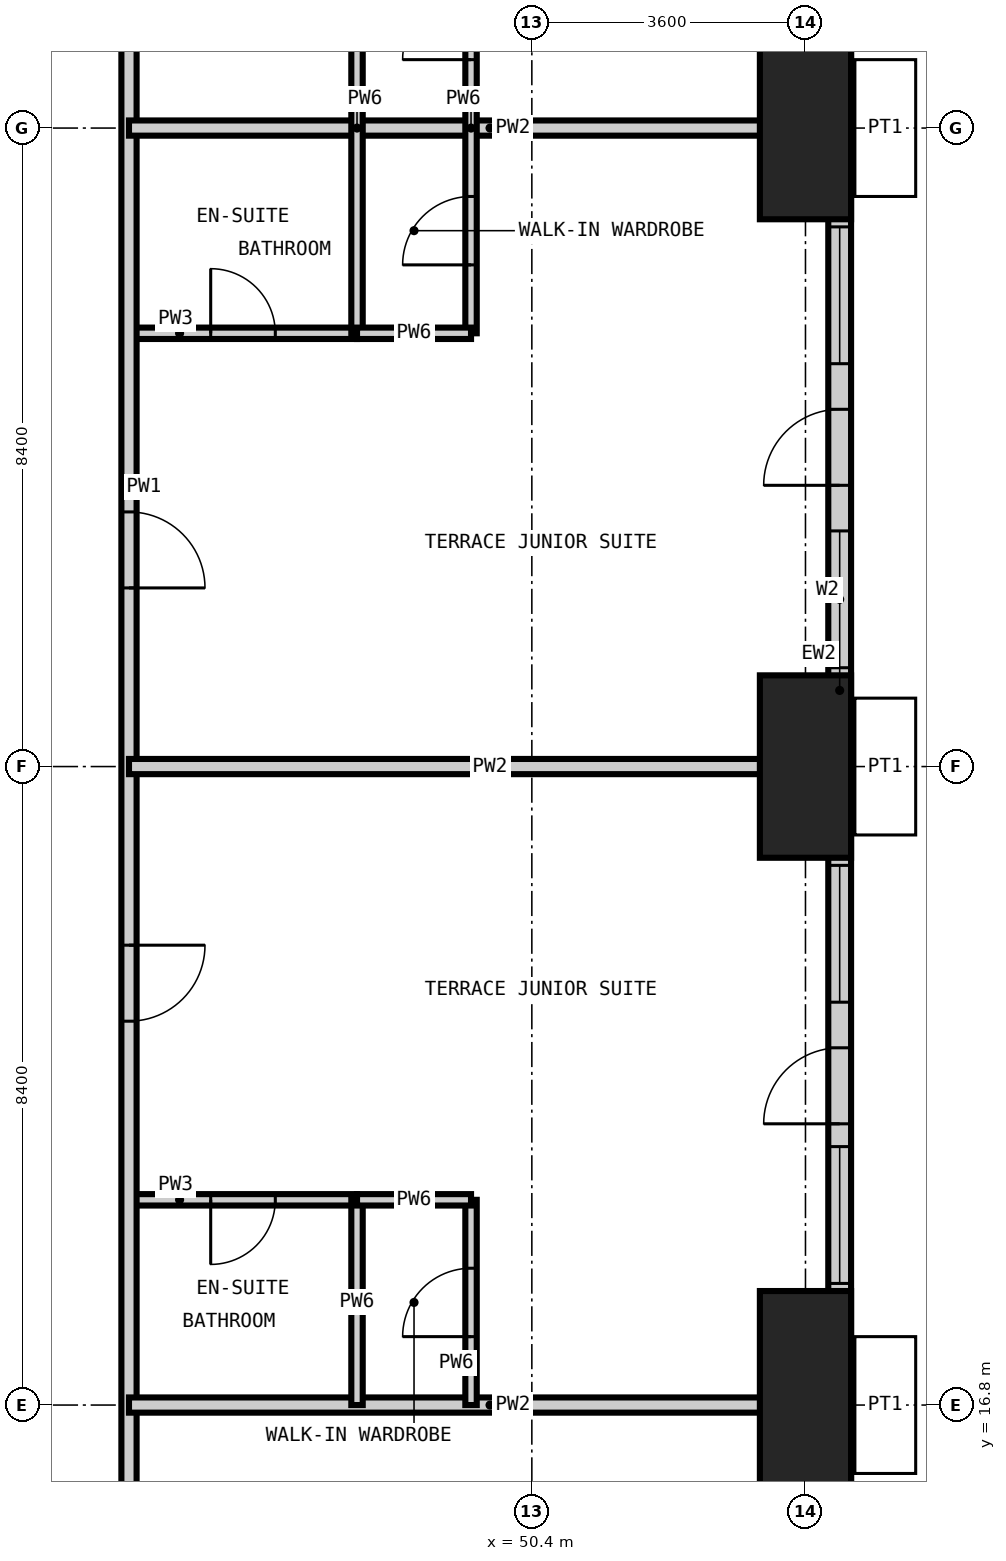
"""IFC4 building model, lengths in metres.
Left out: names, types, materials, properties, quantities, classifications, styles, units other than length and angle.
Written with IfcOpenShell. Run it as: python <this file> out.ifc"""

import sys

from ifc_helpers import new_model, si_unit, direction, frame, frame_2d, origin, origin_2d, place, context, subcontext, project, spatial, rectangle, extrude, element, fill, save


model = new_model("IFC4")
c1 = context("Model", 3, precision=1e-05, world=origin(), true_north=direction((0.0, 1.0)))
c2 = subcontext(c1, "Body", "Model", "MODEL_VIEW")
j1 = project(units=[si_unit("LENGTHUNIT", "METRE"), si_unit("PLANEANGLEUNIT", "RADIAN")], contexts=[c1])
p1 = place(None, origin())
s1 = spatial("IfcSite", under=j1, at=p1, CompositionType="ELEMENT")
p2 = place(p1, origin())
s2 = spatial("IfcBuilding", under=s1, at=p2, CompositionType="ELEMENT")
p3 = place(p2, frame((0.0, 0.0, 93.6)))
s3 = spatial("IfcBuildingStorey", under=s2, at=p3, CompositionType="ELEMENT", Elevation=93.6)
p4 = place(p3, frame((54.0, 16.8, -0.35), z_axis=(0.0, 0.0, 1.0), x_axis=(1.0, 0.0, 0.0)))
e1 = element("IfcColumn", 1, at=p4, inside=s3, PredefinedType="COLUMN", context=c2, shape_type="SweptSolid", body=[
    extrude(rectangle(XDim=1.2, YDim=3.0, at=origin_2d()), origin(), (0.0, 0.0, 1.0), 3.6),
])
for number, where, z_axis, x_axis in (
    (2, (54.0, 25.2, -0.35), (0.0, 0.0, 1.0), (1.0, 0.0, 0.0)),
    (3, (54.0, 33.6, -0.35), (0.0, 0.0, 1.0), (1.0, 0.0, 0.0)),
):
    element("IfcColumn", number, at=place(p3, frame(where, z_axis=z_axis, x_axis=x_axis)), inside=s3, PredefinedType="COLUMN", context=c2, shape_type="SweptSolid", body=[
        extrude(rectangle(XDim=1.2, YDim=2.4, at=origin_2d()), origin(), (0.0, 0.0, 1.0), 3.6),
    ])
p5 = place(p3, frame((54.45, 2.7, 0.0), z_axis=(0.0, 0.0, 1.0), x_axis=(0.0, 1.0, 0.0)))
e4 = element("IfcWall", 4, at=p5, inside=s3, PredefinedType="SOLIDWALL", context=c2, shape_type="SweptSolid", body=[
    extrude(rectangle(XDim=49.2, YDim=0.3, at=frame_2d((24.6, 0.0))), origin(), (0.0, 0.0, 1.0), 3.25),
])
p6 = place(p5, frame((2.35, 0.0, 0.0)))
e5 = element("IfcOpeningElement", 5, at=p6, cuts=e4, PredefinedType="OPENING", context=c2, shape_type="SweptSolid", body=[
    extrude(rectangle(XDim=1.0, YDim=2.4, at=frame_2d((0.5, 1.2))), frame((0.0, 0.16, 0.0), z_axis=(0.0, -1.0, 0.0), x_axis=(1.0, 0.0, 0.0)), (0.0, 0.0, 1.0), 0.32),
])
p7 = place(p5, frame((0.3, 0.0, 0.6)))
e6 = element("IfcOpeningElement", 6, at=p7, cuts=e4, PredefinedType="OPENING", context=c2, shape_type="SweptSolid", body=[
    extrude(rectangle(XDim=1.8, YDim=2.1, at=frame_2d((0.9, 1.05))), frame((0.0, 0.16, 0.0), z_axis=(0.0, -1.0, 0.0), x_axis=(1.0, 0.0, 0.0)), (0.0, 0.0, 1.0), 0.32),
])
p8 = place(p5, frame((9.4, 0.0, 0.0)))
e7 = element("IfcOpeningElement", 7, at=p8, cuts=e4, PredefinedType="OPENING", context=c2, shape_type="SweptSolid", body=[
    extrude(rectangle(XDim=1.0, YDim=2.4, at=frame_2d((0.5, 1.2))), frame((0.0, 0.16, 0.0), z_axis=(0.0, -1.0, 0.0), x_axis=(1.0, 0.0, 0.0)), (0.0, 0.0, 1.0), 0.32),
])
p9 = place(p5, frame((7.0, 0.0, 0.6)))
e8 = element("IfcOpeningElement", 8, at=p9, cuts=e4, PredefinedType="OPENING", context=c2, shape_type="SweptSolid", body=[
    extrude(rectangle(XDim=1.8, YDim=2.1, at=frame_2d((0.9, 1.05))), frame((0.0, 0.16, 0.0), z_axis=(0.0, -1.0, 0.0), x_axis=(1.0, 0.0, 0.0)), (0.0, 0.0, 1.0), 0.32),
])
p10 = place(p5, frame((10.7, 0.0, 0.6)))
e9 = element("IfcOpeningElement", 9, at=p10, cuts=e4, PredefinedType="OPENING", context=c2, shape_type="SweptSolid", body=[
    extrude(rectangle(XDim=1.8, YDim=2.1, at=frame_2d((0.9, 1.05))), frame((0.0, 0.16, 0.0), z_axis=(0.0, -1.0, 0.0), x_axis=(1.0, 0.0, 0.0)), (0.0, 0.0, 1.0), 0.32),
])
p11 = place(p5, frame((17.8, 0.0, 0.0)))
e10 = element("IfcOpeningElement", 10, at=p11, cuts=e4, PredefinedType="OPENING", context=c2, shape_type="SweptSolid", body=[
    extrude(rectangle(XDim=1.0, YDim=2.4, at=frame_2d((0.5, 1.2))), frame((0.0, 0.16, 0.0), z_axis=(0.0, -1.0, 0.0), x_axis=(1.0, 0.0, 0.0)), (0.0, 0.0, 1.0), 0.32),
])
p12 = place(p5, frame((15.7, 0.0, 0.6)))
e11 = element("IfcOpeningElement", 11, at=p12, cuts=e4, PredefinedType="OPENING", context=c2, shape_type="SweptSolid", body=[
    extrude(rectangle(XDim=1.8, YDim=2.1, at=frame_2d((0.9, 1.05))), frame((0.0, 0.16, 0.0), z_axis=(0.0, -1.0, 0.0), x_axis=(1.0, 0.0, 0.0)), (0.0, 0.0, 1.0), 0.32),
])
p13 = place(p5, frame((19.4, 0.0, 0.6)))
e12 = element("IfcOpeningElement", 12, at=p13, cuts=e4, PredefinedType="OPENING", context=c2, shape_type="SweptSolid", body=[
    extrude(rectangle(XDim=1.8, YDim=2.1, at=frame_2d((0.9, 1.05))), frame((0.0, 0.16, 0.0), z_axis=(0.0, -1.0, 0.0), x_axis=(1.0, 0.0, 0.0)), (0.0, 0.0, 1.0), 0.32),
])
p14 = place(p5, frame((26.2, 0.0, 0.0)))
e13 = element("IfcOpeningElement", 13, at=p14, cuts=e4, PredefinedType="OPENING", context=c2, shape_type="SweptSolid", body=[
    extrude(rectangle(XDim=1.0, YDim=2.4, at=frame_2d((0.5, 1.2))), frame((0.0, 0.16, 0.0), z_axis=(0.0, -1.0, 0.0), x_axis=(1.0, 0.0, 0.0)), (0.0, 0.0, 1.0), 0.32),
])
p15 = place(p5, frame((23.8, 0.0, 0.6)))
e14 = element("IfcOpeningElement", 14, at=p15, cuts=e4, PredefinedType="OPENING", context=c2, shape_type="SweptSolid", body=[
    extrude(rectangle(XDim=1.8, YDim=2.1, at=frame_2d((0.9, 1.05))), frame((0.0, 0.16, 0.0), z_axis=(0.0, -1.0, 0.0), x_axis=(1.0, 0.0, 0.0)), (0.0, 0.0, 1.0), 0.32),
])
p16 = place(p5, frame((27.8, 0.0, 0.6)))
e15 = element("IfcOpeningElement", 15, at=p16, cuts=e4, PredefinedType="OPENING", context=c2, shape_type="SweptSolid", body=[
    extrude(rectangle(XDim=1.8, YDim=2.1, at=frame_2d((0.9, 1.05))), frame((0.0, 0.16, 0.0), z_axis=(0.0, -1.0, 0.0), x_axis=(1.0, 0.0, 0.0)), (0.0, 0.0, 1.0), 0.32),
])
p17 = place(p5, frame((34.6, 0.0, 0.0)))
e16 = element("IfcOpeningElement", 16, at=p17, cuts=e4, PredefinedType="OPENING", context=c2, shape_type="SweptSolid", body=[
    extrude(rectangle(XDim=1.0, YDim=2.4, at=frame_2d((0.5, 1.2))), frame((0.0, 0.16, 0.0), z_axis=(0.0, -1.0, 0.0), x_axis=(1.0, 0.0, 0.0)), (0.0, 0.0, 1.0), 0.32),
])
p18 = place(p5, frame((32.2, 0.0, 0.6)))
e17 = element("IfcOpeningElement", 17, at=p18, cuts=e4, PredefinedType="OPENING", context=c2, shape_type="SweptSolid", body=[
    extrude(rectangle(XDim=1.8, YDim=2.1, at=frame_2d((0.9, 1.05))), frame((0.0, 0.16, 0.0), z_axis=(0.0, -1.0, 0.0), x_axis=(1.0, 0.0, 0.0)), (0.0, 0.0, 1.0), 0.32),
])
p19 = place(p5, frame((35.9, 0.0, 0.6)))
e18 = element("IfcOpeningElement", 18, at=p19, cuts=e4, PredefinedType="OPENING", context=c2, shape_type="SweptSolid", body=[
    extrude(rectangle(XDim=1.8, YDim=2.1, at=frame_2d((0.9, 1.05))), frame((0.0, 0.16, 0.0), z_axis=(0.0, -1.0, 0.0), x_axis=(1.0, 0.0, 0.0)), (0.0, 0.0, 1.0), 0.32),
])
p20 = place(p5, frame((40.9, 0.0, 0.0)))
e19 = element("IfcOpeningElement", 19, at=p20, cuts=e4, PredefinedType="OPENING", context=c2, shape_type="SweptSolid", body=[
    extrude(rectangle(XDim=1.0, YDim=2.4, at=frame_2d((0.5, 1.2))), frame((0.0, 0.16, 0.0), z_axis=(0.0, -1.0, 0.0), x_axis=(1.0, 0.0, 0.0)), (0.0, 0.0, 1.0), 0.32),
])
p21 = place(p5, frame((45.45, 0.0, 0.0)))
e20 = element("IfcOpeningElement", 20, at=p21, cuts=e4, PredefinedType="OPENING", context=c2, shape_type="SweptSolid", body=[
    extrude(rectangle(XDim=1.0, YDim=2.4, at=frame_2d((0.5, 1.2))), frame((0.0, 0.16, 0.0), z_axis=(0.0, -1.0, 0.0), x_axis=(1.0, 0.0, 0.0)), (0.0, 0.0, 1.0), 0.32),
])
p22 = place(p3, frame((45.1, 19.5, 0.0), z_axis=(0.0, 0.0, 1.0), x_axis=(1.0, 0.0, 0.0)))
e21 = element("IfcWall", 21, at=p22, inside=s3, PredefinedType="PARTITIONING", context=c2, shape_type="SweptSolid", body=[
    extrude(rectangle(XDim=3.0, YDim=0.15, at=frame_2d((1.5, 0.0))), origin(), (0.0, 0.0, 1.0), 3.25),
])
p23 = place(p22, frame((1.075, 0.0, 0.0)))
e22 = element("IfcOpeningElement", 22, at=p23, cuts=e21, PredefinedType="OPENING", context=c2, shape_type="SweptSolid", body=[
    extrude(rectangle(XDim=0.85, YDim=2.1, at=frame_2d((0.425, 1.05))), frame((0.0, 0.085, 0.0), z_axis=(0.0, -1.0, 0.0), x_axis=(1.0, 0.0, 0.0)), (0.0, 0.0, 1.0), 0.17),
])
p24 = place(p3, frame((45.1, 30.9, 0.0), z_axis=(0.0, 0.0, 1.0), x_axis=(1.0, 0.0, 0.0)))
e23 = element("IfcWall", 23, at=p24, inside=s3, PredefinedType="PARTITIONING", context=c2, shape_type="SweptSolid", body=[
    extrude(rectangle(XDim=3.0, YDim=0.15, at=frame_2d((1.5, 0.0))), origin(), (0.0, 0.0, 1.0), 3.25),
])
p25 = place(p24, frame((1.075, 0.0, 0.0)))
e24 = element("IfcOpeningElement", 24, at=p25, cuts=e23, PredefinedType="OPENING", context=c2, shape_type="SweptSolid", body=[
    extrude(rectangle(XDim=0.85, YDim=2.1, at=frame_2d((0.425, 1.05))), frame((0.0, 0.085, 0.0), z_axis=(0.0, -1.0, 0.0), x_axis=(1.0, 0.0, 0.0)), (0.0, 0.0, 1.0), 0.17),
])
p26 = place(p3, frame((45.1, 44.5, 0.0), z_axis=(0.0, 0.0, 1.0), x_axis=(0.0, -1.0, 0.0)))
e25 = element("IfcWall", 25, at=p26, inside=s3, PredefinedType="PARTITIONING", context=c2, shape_type="SweptSolid", body=[
    extrude(rectangle(XDim=31.4, YDim=0.2, at=frame_2d((15.7, 0.0))), origin(), (0.0, 0.0, 1.0), 3.25),
])
p27 = place(p26, frame((21.65, 0.0, 0.0)))
e26 = element("IfcOpeningElement", 26, at=p27, cuts=e25, PredefinedType="OPENING", context=c2, shape_type="SweptSolid", body=[
    extrude(rectangle(XDim=1.0, YDim=2.2, at=frame_2d((0.5, 1.1))), frame((0.0, 0.11, 0.0), z_axis=(0.0, -1.0, 0.0), x_axis=(1.0, 0.0, 0.0)), (0.0, 0.0, 1.0), 0.22),
])
p28 = place(p26, frame((15.95, 0.0, 0.0)))
e27 = element("IfcOpeningElement", 27, at=p28, cuts=e25, PredefinedType="OPENING", context=c2, shape_type="SweptSolid", body=[
    extrude(rectangle(XDim=1.0, YDim=2.2, at=frame_2d((0.5, 1.1))), frame((0.0, 0.11, 0.0), z_axis=(0.0, -1.0, 0.0), x_axis=(1.0, 0.0, 0.0)), (0.0, 0.0, 1.0), 0.22),
])
p29 = place(p26, frame((4.85, 0.0, 0.0)))
e28 = element("IfcOpeningElement", 28, at=p29, cuts=e25, PredefinedType="OPENING", context=c2, shape_type="SweptSolid", body=[
    extrude(rectangle(XDim=1.0, YDim=2.2, at=frame_2d((0.5, 1.1))), frame((0.0, 0.11, 0.0), z_axis=(0.0, -1.0, 0.0), x_axis=(1.0, 0.0, 0.0)), (0.0, 0.0, 1.0), 0.22),
])
p30 = place(p26, frame((29.05, 0.0, 0.0)))
e29 = element("IfcOpeningElement", 29, at=p30, cuts=e25, PredefinedType="OPENING", context=c2, shape_type="SweptSolid", body=[
    extrude(rectangle(XDim=1.0, YDim=2.2, at=frame_2d((0.5, 1.1))), frame((0.0, 0.11, 0.0), z_axis=(0.0, -1.0, 0.0), x_axis=(1.0, 0.0, 0.0)), (0.0, 0.0, 1.0), 0.22),
])
p31 = place(p26, frame((0.75, 0.0, 0.0)))
e30 = element("IfcOpeningElement", 30, at=p31, cuts=e25, PredefinedType="OPENING", context=c2, shape_type="SweptSolid", body=[
    extrude(rectangle(XDim=1.0, YDim=2.2, at=frame_2d((0.5, 1.1))), frame((0.0, 0.11, 0.0), z_axis=(0.0, -1.0, 0.0), x_axis=(1.0, 0.0, 0.0)), (0.0, 0.0, 1.0), 0.22),
])
for number, where, z_axis, x_axis in (
    (31, (45.1, 16.8, 0.0), (0.0, 0.0, 1.0), (1.0, 0.0, 0.0)),
    (32, (45.1, 25.2, 0.0), (0.0, 0.0, 1.0), (1.0, 0.0, 0.0)),
    (33, (45.1, 33.6, 0.0), (0.0, 0.0, 1.0), (1.0, 0.0, 0.0)),
):
    element("IfcWall", number, at=place(p3, frame(where, z_axis=z_axis, x_axis=x_axis)), inside=s3, PredefinedType="PARTITIONING", context=c2, shape_type="SweptSolid", body=[
        extrude(rectangle(XDim=9.5, YDim=0.2, at=frame_2d((4.75, 0.0))), origin(), (0.0, 0.0, 1.0), 3.25),
    ])
p32 = place(p3, frame((48.1, 16.8, 0.0), z_axis=(0.0, 0.0, 1.0), x_axis=(0.0, 1.0, 0.0)))
e34 = element("IfcWall", 34, at=p32, inside=s3, PredefinedType="PARTITIONING", context=c2, shape_type="SweptSolid", body=[
    extrude(rectangle(XDim=2.7, YDim=0.15, at=frame_2d((1.35, 0.0))), origin(), (0.0, 0.0, 1.0), 3.25),
])
p33 = place(p3, frame((48.1, 30.9, 0.0), z_axis=(0.0, 0.0, 1.0), x_axis=(0.0, 1.0, 0.0)))
e35 = element("IfcWall", 35, at=p33, inside=s3, PredefinedType="PARTITIONING", context=c2, shape_type="SweptSolid", body=[
    extrude(rectangle(XDim=5.4, YDim=0.15, at=frame_2d((2.7, 0.0))), origin(), (0.0, 0.0, 1.0), 3.25),
])
p34 = place(p3, frame((49.6, 16.8, 0.0), z_axis=(0.0, 0.0, 1.0), x_axis=(0.0, 1.0, 0.0)))
e36 = element("IfcWall", 36, at=p34, inside=s3, PredefinedType="PARTITIONING", context=c2, shape_type="SweptSolid", body=[
    extrude(rectangle(XDim=2.7, YDim=0.15, at=frame_2d((1.35, 0.0))), origin(), (0.0, 0.0, 1.0), 3.25),
])
p35 = place(p34, frame((0.9, 0.0, 0.0)))
e37 = element("IfcOpeningElement", 37, at=p35, cuts=e36, PredefinedType="OPENING", context=c2, shape_type="SweptSolid", body=[
    extrude(rectangle(XDim=0.9, YDim=2.1, at=frame_2d((0.45, 1.05))), frame((0.0, 0.085, 0.0), z_axis=(0.0, -1.0, 0.0), x_axis=(1.0, 0.0, 0.0)), (0.0, 0.0, 1.0), 0.17),
])
p36 = place(p3, frame((49.6, 30.9, 0.0), z_axis=(0.0, 0.0, 1.0), x_axis=(0.0, 1.0, 0.0)))
e38 = element("IfcWall", 38, at=p36, inside=s3, PredefinedType="PARTITIONING", context=c2, shape_type="SweptSolid", body=[
    extrude(rectangle(XDim=5.4, YDim=0.15, at=frame_2d((2.7, 0.0))), origin(), (0.0, 0.0, 1.0), 3.25),
])
p37 = place(p36, frame((0.9, 0.0, 0.0)))
e39 = element("IfcOpeningElement", 39, at=p37, cuts=e38, PredefinedType="OPENING", context=c2, shape_type="SweptSolid", body=[
    extrude(rectangle(XDim=0.9, YDim=2.1, at=frame_2d((0.45, 1.05))), frame((0.0, 0.085, 0.0), z_axis=(0.0, -1.0, 0.0), x_axis=(1.0, 0.0, 0.0)), (0.0, 0.0, 1.0), 0.17),
])
p38 = place(p36, frame((3.6, 0.0, 0.0)))
e40 = element("IfcOpeningElement", 40, at=p38, cuts=e38, PredefinedType="OPENING", context=c2, shape_type="SweptSolid", body=[
    extrude(rectangle(XDim=0.9, YDim=2.1, at=frame_2d((0.45, 1.05))), frame((0.0, 0.085, 0.0), z_axis=(0.0, -1.0, 0.0), x_axis=(1.0, 0.0, 0.0)), (0.0, 0.0, 1.0), 0.17),
])
for number, where, z_axis, x_axis in (
    (41, (48.1, 19.5, 0.0), (0.0, 0.0, 1.0), (1.0, 0.0, 0.0)),
    (42, (48.1, 30.9, 0.0), (0.0, 0.0, 1.0), (1.0, 0.0, 0.0)),
):
    element("IfcWall", number, at=place(p3, frame(where, z_axis=z_axis, x_axis=x_axis)), inside=s3, PredefinedType="PARTITIONING", context=c2, shape_type="SweptSolid", body=[
        extrude(rectangle(XDim=1.5, YDim=0.15, at=frame_2d((0.75, 0.0))), origin(), (0.0, 0.0, 1.0), 3.25),
    ])
p39 = place(p11, origin())
e43 = element("IfcDoor", 43, at=p39, inside=s3, OperationType="SINGLE_SWING_LEFT", PredefinedType="DOOR", context=c2, shape_type="SweptSolid", body=[
    extrude(rectangle(XDim=1.0, YDim=2.4, at=frame_2d((0.5, 1.2))), frame((0.0, 0.025, 0.0), z_axis=(0.0, -1.0, 0.0), x_axis=(1.0, 0.0, 0.0)), (0.0, 0.0, 1.0), 0.05),
])
fill(e10, e43)
p40 = place(p12, origin())
e44 = element("IfcWindow", 44, at=p40, inside=s3, PartitioningType="SINGLE_PANEL", PredefinedType="WINDOW", context=c2, shape_type="SweptSolid", body=[
    extrude(rectangle(XDim=1.8, YDim=2.1, at=frame_2d((0.9, 1.05))), frame((0.0, 0.03, 0.0), z_axis=(0.0, -1.0, 0.0), x_axis=(1.0, 0.0, 0.0)), (0.0, 0.0, 1.0), 0.06),
])
fill(e11, e44)
p41 = place(p13, origin())
e45 = element("IfcWindow", 45, at=p41, inside=s3, PartitioningType="SINGLE_PANEL", PredefinedType="WINDOW", context=c2, shape_type="SweptSolid", body=[
    extrude(rectangle(XDim=1.8, YDim=2.1, at=frame_2d((0.9, 1.05))), frame((0.0, 0.03, 0.0), z_axis=(0.0, -1.0, 0.0), x_axis=(1.0, 0.0, 0.0)), (0.0, 0.0, 1.0), 0.06),
])
fill(e12, e45)
p42 = place(p14, origin())
e46 = element("IfcDoor", 46, at=p42, inside=s3, OperationType="SINGLE_SWING_LEFT", PredefinedType="DOOR", context=c2, shape_type="SweptSolid", body=[
    extrude(rectangle(XDim=1.0, YDim=2.4, at=frame_2d((0.5, 1.2))), frame((0.0, 0.025, 0.0), z_axis=(0.0, -1.0, 0.0), x_axis=(1.0, 0.0, 0.0)), (0.0, 0.0, 1.0), 0.05),
])
fill(e13, e46)
p43 = place(p15, origin())
e47 = element("IfcWindow", 47, at=p43, inside=s3, PartitioningType="SINGLE_PANEL", PredefinedType="WINDOW", context=c2, shape_type="SweptSolid", body=[
    extrude(rectangle(XDim=1.8, YDim=2.1, at=frame_2d((0.9, 1.05))), frame((0.0, 0.03, 0.0), z_axis=(0.0, -1.0, 0.0), x_axis=(1.0, 0.0, 0.0)), (0.0, 0.0, 1.0), 0.06),
])
fill(e14, e47)
p44 = place(p16, origin())
e48 = element("IfcWindow", 48, at=p44, inside=s3, PartitioningType="SINGLE_PANEL", PredefinedType="WINDOW", context=c2, shape_type="SweptSolid", body=[
    extrude(rectangle(XDim=1.8, YDim=2.1, at=frame_2d((0.9, 1.05))), frame((0.0, 0.03, 0.0), z_axis=(0.0, -1.0, 0.0), x_axis=(1.0, 0.0, 0.0)), (0.0, 0.0, 1.0), 0.06),
])
fill(e15, e48)
p45 = place(p27, origin())
e49 = element("IfcDoor", 49, at=p45, inside=s3, OperationType="SINGLE_SWING_LEFT", PredefinedType="DOOR", context=c2, shape_type="SweptSolid", body=[
    extrude(rectangle(XDim=1.0, YDim=2.2, at=frame_2d((0.5, 1.1))), frame((0.0, 0.025, 0.0), z_axis=(0.0, -1.0, 0.0), x_axis=(1.0, 0.0, 0.0)), (0.0, 0.0, 1.0), 0.05),
])
fill(e26, e49)
p46 = place(p23, frame((0.85, 0.0, 0.0), z_axis=(0.0, 0.0, 1.0), x_axis=(-1.0, 0.0, 0.0)))
e50 = element("IfcDoor", 50, at=p46, inside=s3, OperationType="SINGLE_SWING_RIGHT", PredefinedType="DOOR", context=c2, shape_type="SweptSolid", body=[
    extrude(rectangle(XDim=0.85, YDim=2.1, at=frame_2d((0.425, 1.05))), frame((0.0, 0.025, 0.0), z_axis=(0.0, -1.0, 0.0), x_axis=(1.0, 0.0, 0.0)), (0.0, 0.0, 1.0), 0.05),
])
fill(e22, e50)
p47 = place(p35, origin())
e51 = element("IfcDoor", 51, at=p47, inside=s3, OperationType="SINGLE_SWING_LEFT", PredefinedType="DOOR", context=c2, shape_type="SweptSolid", body=[
    extrude(rectangle(XDim=0.9, YDim=2.1, at=frame_2d((0.45, 1.05))), frame((0.0, 0.025, 0.0), z_axis=(0.0, -1.0, 0.0), x_axis=(1.0, 0.0, 0.0)), (0.0, 0.0, 1.0), 0.05),
])
fill(e37, e51)
p48 = place(p28, origin())
e52 = element("IfcDoor", 52, at=p48, inside=s3, OperationType="SINGLE_SWING_RIGHT", PredefinedType="DOOR", context=c2, shape_type="SweptSolid", body=[
    extrude(rectangle(XDim=1.0, YDim=2.2, at=frame_2d((0.5, 1.1))), frame((0.0, 0.025, 0.0), z_axis=(0.0, -1.0, 0.0), x_axis=(1.0, 0.0, 0.0)), (0.0, 0.0, 1.0), 0.05),
])
fill(e27, e52)
p49 = place(p25, origin())
e53 = element("IfcDoor", 53, at=p49, inside=s3, OperationType="SINGLE_SWING_LEFT", PredefinedType="DOOR", context=c2, shape_type="SweptSolid", body=[
    extrude(rectangle(XDim=0.85, YDim=2.1, at=frame_2d((0.425, 1.05))), frame((0.0, 0.025, 0.0), z_axis=(0.0, -1.0, 0.0), x_axis=(1.0, 0.0, 0.0)), (0.0, 0.0, 1.0), 0.05),
])
fill(e24, e53)
p50 = place(p37, origin())
e54 = element("IfcDoor", 54, at=p50, inside=s3, OperationType="SINGLE_SWING_LEFT", PredefinedType="DOOR", context=c2, shape_type="SweptSolid", body=[
    extrude(rectangle(XDim=0.9, YDim=2.1, at=frame_2d((0.45, 1.05))), frame((0.0, 0.025, 0.0), z_axis=(0.0, -1.0, 0.0), x_axis=(1.0, 0.0, 0.0)), (0.0, 0.0, 1.0), 0.05),
])
fill(e39, e54)
p51 = place(p38, origin())
e55 = element("IfcDoor", 55, at=p51, inside=s3, OperationType="SINGLE_SWING_LEFT", PredefinedType="DOOR", context=c2, shape_type="SweptSolid", body=[
    extrude(rectangle(XDim=0.9, YDim=2.1, at=frame_2d((0.45, 1.05))), frame((0.0, 0.025, 0.0), z_axis=(0.0, -1.0, 0.0), x_axis=(1.0, 0.0, 0.0)), (0.0, 0.0, 1.0), 0.05),
])
fill(e40, e55)
save(model, sys.argv[1])
